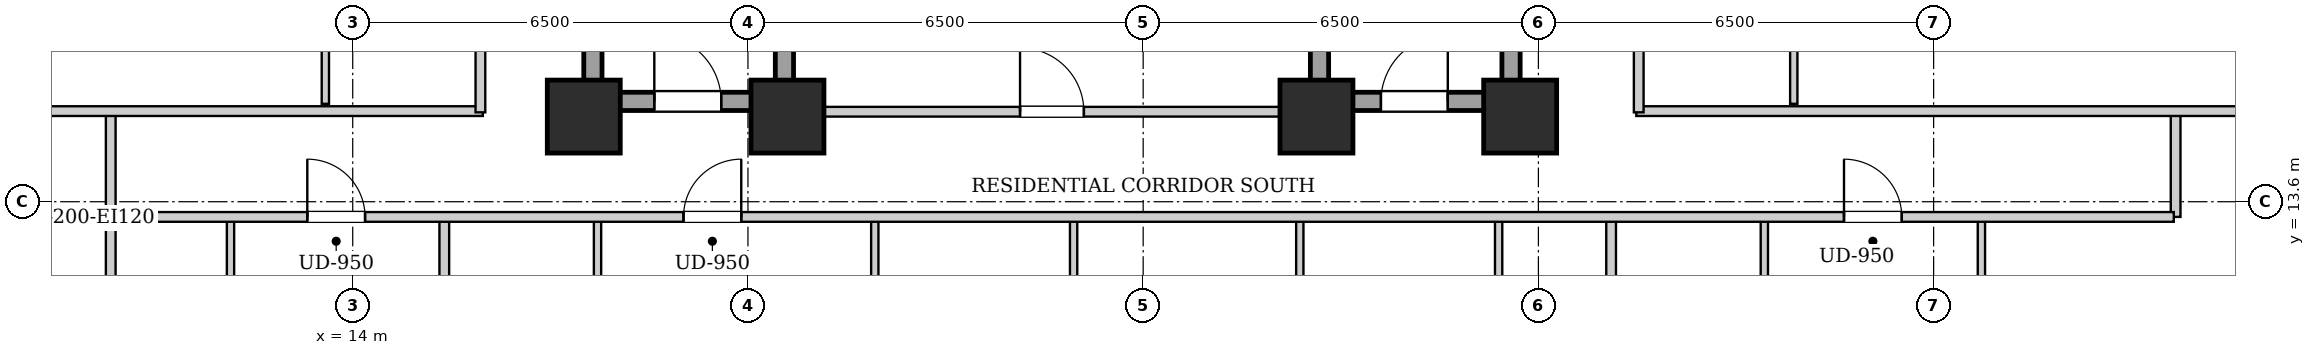
"""IFC4 building model, lengths in metres.
Left out: names, types, materials, properties, quantities, classifications, styles, units other than length and angle.
Written with IfcOpenShell. Run it as: python <this file> out.ifc"""

import sys

from ifc_helpers import new_model, si_unit, direction, frame, frame_2d, origin, origin_2d, place, context, subcontext, project, spatial, rectangle, extrude, element, fill, save


model = new_model("IFC4")
c1 = context("Model", 3, precision=1e-05, world=origin(), true_north=direction((0.0, 1.0)))
c2 = subcontext(c1, "Body", "Model", "MODEL_VIEW")
j1 = project(units=[si_unit("LENGTHUNIT", "METRE"), si_unit("PLANEANGLEUNIT", "RADIAN")], contexts=[c1])
p1 = place(None, origin())
s1 = spatial("IfcSite", under=j1, at=p1, CompositionType="ELEMENT")
p2 = place(p1, origin())
s2 = spatial("IfcBuilding", under=s1, at=p2, CompositionType="ELEMENT")
p3 = place(p2, frame((0.0, 0.0, 48.2)))
s3 = spatial("IfcBuildingStorey", under=s2, at=p3, CompositionType="ELEMENT", Elevation=48.2)
for number, where, z_axis, x_axis in (
    (1, (17.8, 15.0, 0.0), (0.0, 0.0, 1.0), (1.0, 0.0, 0.0)),
    (2, (21.15, 15.0, 0.0), (0.0, 0.0, 1.0), (1.0, 0.0, 0.0)),
    (3, (29.85, 15.0, 0.0), (0.0, 0.0, 1.0), (1.0, 0.0, 0.0)),
    (4, (33.2, 15.0, 0.0), (0.0, 0.0, 1.0), (1.0, 0.0, 0.0)),
):
    element("IfcColumn", number, at=place(p3, frame(where, z_axis=z_axis, x_axis=x_axis)), inside=s3, PredefinedType="COLUMN", context=c2, shape_type="SweptSolid", body=[
        extrude(rectangle(XDim=1.2, YDim=1.2, at=origin_2d()), origin(), (0.0, 0.0, 1.0), 3.2),
    ])
for number, where, z_axis, x_axis in (
    (5, (17.95, 15.1, 0.0), (0.0, 0.0, 1.0), (0.0, 1.0, 0.0)),
    (6, (21.1, 15.1, 0.0), (0.0, 0.0, 1.0), (0.0, 1.0, 0.0)),
):
    element("IfcWall", number, at=place(p3, frame(where, z_axis=z_axis, x_axis=x_axis)), inside=s3, PredefinedType="SHEAR", context=c2, shape_type="SweptSolid", body=[
        extrude(rectangle(XDim=9.0, YDim=0.3, at=frame_2d((4.5, 0.0))), origin(), (0.0, 0.0, 1.0), 2.94),
    ])
p4 = place(p3, frame((18.1, 15.25, 0.0), z_axis=(0.0, 0.0, 1.0), x_axis=(1.0, 0.0, 0.0)))
e7 = element("IfcWall", 7, at=p4, inside=s3, PredefinedType="SHEAR", context=c2, shape_type="SweptSolid", body=[
    extrude(rectangle(XDim=2.85, YDim=0.3, at=frame_2d((1.425, 0.0))), origin(), (0.0, 0.0, 1.0), 2.94),
])
p5 = place(p4, frame((0.86, 0.0, 0.0)))
e8 = element("IfcOpeningElement", 8, at=p5, cuts=e7, PredefinedType="OPENING", context=c2, shape_type="SweptSolid", body=[
    extrude(rectangle(XDim=1.1, YDim=2.05, at=frame_2d((0.55, 1.025))), frame((0.0, 0.16, 0.0), z_axis=(0.0, -1.0, 0.0), x_axis=(1.0, 0.0, 0.0)), (0.0, 0.0, 1.0), 0.32),
])
for number, where, z_axis, x_axis in (
    (9, (29.9, 15.1, 0.0), (0.0, 0.0, 1.0), (0.0, 1.0, 0.0)),
    (10, (33.05, 15.1, 0.0), (0.0, 0.0, 1.0), (0.0, 1.0, 0.0)),
):
    element("IfcWall", number, at=place(p3, frame(where, z_axis=z_axis, x_axis=x_axis)), inside=s3, PredefinedType="SHEAR", context=c2, shape_type="SweptSolid", body=[
        extrude(rectangle(XDim=9.0, YDim=0.3, at=frame_2d((4.5, 0.0))), origin(), (0.0, 0.0, 1.0), 2.94),
    ])
p6 = place(p3, frame((30.05, 15.25, 0.0), z_axis=(0.0, 0.0, 1.0), x_axis=(1.0, 0.0, 0.0)))
e11 = element("IfcWall", 11, at=p6, inside=s3, PredefinedType="SHEAR", context=c2, shape_type="SweptSolid", body=[
    extrude(rectangle(XDim=2.85, YDim=0.3, at=frame_2d((1.425, 0.0))), origin(), (0.0, 0.0, 1.0), 2.94),
])
p7 = place(p6, frame((0.86, 0.0, 0.0)))
e12 = element("IfcOpeningElement", 12, at=p7, cuts=e11, PredefinedType="OPENING", context=c2, shape_type="SweptSolid", body=[
    extrude(rectangle(XDim=1.1, YDim=2.05, at=frame_2d((0.55, 1.025))), frame((0.0, 0.16, 0.0), z_axis=(0.0, -1.0, 0.0), x_axis=(1.0, 0.0, 0.0)), (0.0, 0.0, 1.0), 0.32),
])
p8 = place(p3, frame((21.25, 15.08, 0.0), z_axis=(0.0, 0.0, 1.0), x_axis=(1.0, 0.0, 0.0)))
e13 = element("IfcWall", 13, at=p8, inside=s3, PredefinedType="PARTITIONING", context=c2, shape_type="SweptSolid", body=[
    extrude(rectangle(XDim=8.5, YDim=0.16, at=frame_2d((4.25, 0.0))), origin(), (0.0, 0.0, 1.0), 2.232),
])
p9 = place(p8, frame((3.725, 0.0, 0.0)))
e14 = element("IfcOpeningElement", 14, at=p9, cuts=e13, PredefinedType="OPENING", context=c2, shape_type="SweptSolid", body=[
    extrude(rectangle(XDim=1.05, YDim=2.05, at=frame_2d((0.525, 1.025))), frame((0.0, 0.09, 0.0), z_axis=(0.0, -1.0, 0.0), x_axis=(1.0, 0.0, 0.0)), (0.0, 0.0, 1.0), 0.18),
])
for number, where, z_axis, x_axis in (
    (15, (10.02, 13.35, 0.0), (0.0, 0.0, 1.0), (0.0, 1.0, 0.0)),
    (16, (43.98, 13.35, 0.0), (0.0, 0.0, 1.0), (0.0, 1.0, 0.0)),
):
    element("IfcWall", number, at=place(p3, frame(where, z_axis=z_axis, x_axis=x_axis)), inside=s3, PredefinedType="PARTITIONING", context=c2, shape_type="SweptSolid", body=[
        extrude(rectangle(XDim=1.74, YDim=0.16, at=frame_2d((0.87, 0.0))), origin(), (0.0, 0.0, 1.0), 2.94),
    ])
p10 = place(p3, frame((7.78, 15.09, 0.0), z_axis=(0.0, 0.0, 1.0), x_axis=(1.0, 0.0, 0.0)))
e17 = element("IfcWall", 17, at=p10, inside=s3, PredefinedType="PARTITIONING", context=c2, shape_type="SweptSolid", body=[
    extrude(rectangle(XDim=8.36, YDim=0.16, at=frame_2d((4.18, 0.0))), origin(), (0.0, 0.0, 1.0), 2.232),
])
p11 = place(p3, frame((35.11, 15.09, 0.0), z_axis=(0.0, 0.0, 1.0), x_axis=(1.0, 0.0, 0.0)))
e18 = element("IfcWall", 18, at=p11, inside=s3, PredefinedType="PARTITIONING", context=c2, shape_type="SweptSolid", body=[
    extrude(rectangle(XDim=11.11, YDim=0.16, at=frame_2d((5.555, 0.0))), origin(), (0.0, 0.0, 1.0), 2.232),
])
p12 = place(p3, frame((10.02, 10.4, 0.0), z_axis=(0.0, 0.0, 1.0), x_axis=(0.0, 1.0, 0.0)))
e19 = element("IfcWall", 19, at=p12, inside=s3, PredefinedType="PARTITIONING", context=c2, shape_type="SweptSolid", body=[
    extrude(rectangle(XDim=2.91, YDim=0.16, at=frame_2d((1.455, 0.0))), origin(), (0.0, 0.0, 1.0), 2.94),
])
p13 = place(p3, frame((11.99, 10.46, 0.0), z_axis=(0.0, 0.0, 1.0), x_axis=(0.0, 1.0, 0.0)))
e20 = element("IfcWall", 20, at=p13, inside=s3, PredefinedType="PARTITIONING", context=c2, shape_type="SweptSolid", body=[
    extrude(rectangle(XDim=2.85, YDim=0.12, at=frame_2d((1.425, 0.0))), origin(), (0.0, 0.0, 1.0), 2.94),
])
p14 = place(p13, frame((0.995, 0.0, 0.0)))
e21 = element("IfcOpeningElement", 21, at=p14, cuts=e20, PredefinedType="OPENING", context=c2, shape_type="SweptSolid", body=[
    extrude(rectangle(XDim=0.86, YDim=2.05, at=frame_2d((0.43, 1.025))), frame((0.0, 0.07, 0.0), z_axis=(0.0, -1.0, 0.0), x_axis=(1.0, 0.0, 0.0)), (0.0, 0.0, 1.0), 0.14),
])
p15 = place(p3, frame((15.506, 2.26, 0.0), z_axis=(0.0, 0.0, 1.0), x_axis=(0.0, 1.0, 0.0)))
e22 = element("IfcWall", 22, at=p15, inside=s3, PredefinedType="PARTITIONING", context=c2, shape_type="SweptSolid", body=[
    extrude(rectangle(XDim=11.05, YDim=0.16, at=frame_2d((5.525, 0.0))), origin(), (0.0, 0.0, 1.0), 2.94),
])
p16 = place(p3, frame((18.026, 10.46, 0.0), z_axis=(0.0, 0.0, 1.0), x_axis=(0.0, 1.0, 0.0)))
e23 = element("IfcWall", 23, at=p16, inside=s3, PredefinedType="PARTITIONING", context=c2, shape_type="SweptSolid", body=[
    extrude(rectangle(XDim=2.85, YDim=0.12, at=frame_2d((1.425, 0.0))), origin(), (0.0, 0.0, 1.0), 2.94),
])
p17 = place(p16, frame((0.995, 0.0, 0.0)))
e24 = element("IfcOpeningElement", 24, at=p17, cuts=e23, PredefinedType="OPENING", context=c2, shape_type="SweptSolid", body=[
    extrude(rectangle(XDim=0.86, YDim=2.05, at=frame_2d((0.43, 1.025))), frame((0.0, 0.07, 0.0), z_axis=(0.0, -1.0, 0.0), x_axis=(1.0, 0.0, 0.0)), (0.0, 0.0, 1.0), 0.14),
])
p18 = place(p3, frame((22.586, 10.46, 0.0), z_axis=(0.0, 0.0, 1.0), x_axis=(0.0, 1.0, 0.0)))
e25 = element("IfcWall", 25, at=p18, inside=s3, PredefinedType="PARTITIONING", context=c2, shape_type="SweptSolid", body=[
    extrude(rectangle(XDim=2.85, YDim=0.12, at=frame_2d((1.425, 0.0))), origin(), (0.0, 0.0, 1.0), 2.94),
])
p19 = place(p18, frame((0.975, 0.0, 0.0)))
e26 = element("IfcOpeningElement", 26, at=p19, cuts=e25, PredefinedType="OPENING", context=c2, shape_type="SweptSolid", body=[
    extrude(rectangle(XDim=0.9, YDim=2.05, at=frame_2d((0.45, 1.025))), frame((0.0, 0.07, 0.0), z_axis=(0.0, -1.0, 0.0), x_axis=(1.0, 0.0, 0.0)), (0.0, 0.0, 1.0), 0.14),
])
p20 = place(p3, frame((25.856, 10.46, 0.0), z_axis=(0.0, 0.0, 1.0), x_axis=(0.0, 1.0, 0.0)))
e27 = element("IfcWall", 27, at=p20, inside=s3, PredefinedType="PARTITIONING", context=c2, shape_type="SweptSolid", body=[
    extrude(rectangle(XDim=2.85, YDim=0.12, at=frame_2d((1.425, 0.0))), origin(), (0.0, 0.0, 1.0), 2.94),
])
p21 = place(p20, frame((0.975, 0.0, 0.0)))
e28 = element("IfcOpeningElement", 28, at=p21, cuts=e27, PredefinedType="OPENING", context=c2, shape_type="SweptSolid", body=[
    extrude(rectangle(XDim=0.9, YDim=2.05, at=frame_2d((0.45, 1.025))), frame((0.0, 0.07, 0.0), z_axis=(0.0, -1.0, 0.0), x_axis=(1.0, 0.0, 0.0)), (0.0, 0.0, 1.0), 0.14),
])
p22 = place(p3, frame((29.576, 10.46, 0.0), z_axis=(0.0, 0.0, 1.0), x_axis=(0.0, 1.0, 0.0)))
e29 = element("IfcWall", 29, at=p22, inside=s3, PredefinedType="PARTITIONING", context=c2, shape_type="SweptSolid", body=[
    extrude(rectangle(XDim=2.85, YDim=0.12, at=frame_2d((1.425, 0.0))), origin(), (0.0, 0.0, 1.0), 2.94),
])
p23 = place(p22, frame((0.975, 0.0, 0.0)))
e30 = element("IfcOpeningElement", 30, at=p23, cuts=e29, PredefinedType="OPENING", context=c2, shape_type="SweptSolid", body=[
    extrude(rectangle(XDim=0.9, YDim=2.05, at=frame_2d((0.45, 1.025))), frame((0.0, 0.07, 0.0), z_axis=(0.0, -1.0, 0.0), x_axis=(1.0, 0.0, 0.0)), (0.0, 0.0, 1.0), 0.14),
])
p24 = place(p3, frame((32.846, 10.46, 0.0), z_axis=(0.0, 0.0, 1.0), x_axis=(0.0, 1.0, 0.0)))
e31 = element("IfcWall", 31, at=p24, inside=s3, PredefinedType="PARTITIONING", context=c2, shape_type="SweptSolid", body=[
    extrude(rectangle(XDim=2.85, YDim=0.12, at=frame_2d((1.425, 0.0))), origin(), (0.0, 0.0, 1.0), 2.94),
])
p25 = place(p24, frame((0.975, 0.0, 0.0)))
e32 = element("IfcOpeningElement", 32, at=p25, cuts=e31, PredefinedType="OPENING", context=c2, shape_type="SweptSolid", body=[
    extrude(rectangle(XDim=0.9, YDim=2.05, at=frame_2d((0.45, 1.025))), frame((0.0, 0.07, 0.0), z_axis=(0.0, -1.0, 0.0), x_axis=(1.0, 0.0, 0.0)), (0.0, 0.0, 1.0), 0.14),
])
p26 = place(p3, frame((34.696, 0.28, 0.0), z_axis=(0.0, 0.0, 1.0), x_axis=(0.0, 1.0, 0.0)))
e33 = element("IfcWall", 33, at=p26, inside=s3, PredefinedType="PARTITIONING", context=c2, shape_type="SweptSolid", body=[
    extrude(rectangle(XDim=13.03, YDim=0.16, at=frame_2d((6.515, 0.0))), origin(), (0.0, 0.0, 1.0), 2.94),
])
p27 = place(p3, frame((37.216, 10.46, 0.0), z_axis=(0.0, 0.0, 1.0), x_axis=(0.0, 1.0, 0.0)))
e34 = element("IfcWall", 34, at=p27, inside=s3, PredefinedType="PARTITIONING", context=c2, shape_type="SweptSolid", body=[
    extrude(rectangle(XDim=2.85, YDim=0.12, at=frame_2d((1.425, 0.0))), origin(), (0.0, 0.0, 1.0), 2.94),
])
p28 = place(p27, frame((0.995, 0.0, 0.0)))
e35 = element("IfcOpeningElement", 35, at=p28, cuts=e34, PredefinedType="OPENING", context=c2, shape_type="SweptSolid", body=[
    extrude(rectangle(XDim=0.86, YDim=2.05, at=frame_2d((0.43, 1.025))), frame((0.0, 0.07, 0.0), z_axis=(0.0, -1.0, 0.0), x_axis=(1.0, 0.0, 0.0)), (0.0, 0.0, 1.0), 0.14),
])
p29 = place(p3, frame((40.786, 10.46, 0.0), z_axis=(0.0, 0.0, 1.0), x_axis=(0.0, 1.0, 0.0)))
e36 = element("IfcWall", 36, at=p29, inside=s3, PredefinedType="PARTITIONING", context=c2, shape_type="SweptSolid", body=[
    extrude(rectangle(XDim=2.85, YDim=0.12, at=frame_2d((1.425, 0.0))), origin(), (0.0, 0.0, 1.0), 2.94),
])
p30 = place(p29, frame((0.975, 0.0, 0.0)))
e37 = element("IfcOpeningElement", 37, at=p30, cuts=e36, PredefinedType="OPENING", context=c2, shape_type="SweptSolid", body=[
    extrude(rectangle(XDim=0.9, YDim=2.05, at=frame_2d((0.45, 1.025))), frame((0.0, 0.07, 0.0), z_axis=(0.0, -1.0, 0.0), x_axis=(1.0, 0.0, 0.0)), (0.0, 0.0, 1.0), 0.14),
])
p31 = place(p3, frame((13.55, 15.21, 0.0), z_axis=(0.0, 0.0, 1.0), x_axis=(0.0, 1.0, 0.0)))
e38 = element("IfcWall", 38, at=p31, inside=s3, PredefinedType="PARTITIONING", context=c2, shape_type="SweptSolid", body=[
    extrude(rectangle(XDim=2.3, YDim=0.12, at=frame_2d((1.15, 0.0))), origin(), (0.0, 0.0, 1.0), 2.94),
])
p32 = place(p3, frame((37.7, 15.21, 0.0), z_axis=(0.0, 0.0, 1.0), x_axis=(0.0, 1.0, 0.0)))
e39 = element("IfcWall", 39, at=p32, inside=s3, PredefinedType="PARTITIONING", context=c2, shape_type="SweptSolid", body=[
    extrude(rectangle(XDim=2.159, YDim=0.12, at=frame_2d((1.08, 0.0))), origin(), (0.0, 0.0, 1.0), 2.94),
])
p33 = place(p3, frame((10.05, 13.35, 0.0), z_axis=(0.0, 0.0, 1.0), x_axis=(1.0, 0.0, 0.0)))
e40 = element("IfcWall", 40, at=p33, inside=s3, PredefinedType="PARTITIONING", context=c2, shape_type="SweptSolid", body=[
    extrude(rectangle(XDim=33.9, YDim=0.16, at=frame_2d((16.95, 0.0))), origin(), (0.0, 0.0, 1.0), 2.94),
])
p34 = place(p33, frame((3.203, 0.0, 0.0)))
e41 = element("IfcOpeningElement", 41, at=p34, cuts=e40, PredefinedType="OPENING", context=c2, shape_type="SweptSolid", body=[
    extrude(rectangle(XDim=0.95, YDim=2.1, at=frame_2d((0.475, 1.05))), frame((0.0, 0.09, 0.0), z_axis=(0.0, -1.0, 0.0), x_axis=(1.0, 0.0, 0.0)), (0.0, 0.0, 1.0), 0.18),
])
p35 = place(p33, frame((9.39, 0.0, 0.0)))
e42 = element("IfcOpeningElement", 42, at=p35, cuts=e40, PredefinedType="OPENING", context=c2, shape_type="SweptSolid", body=[
    extrude(rectangle(XDim=0.95, YDim=2.1, at=frame_2d((0.475, 1.05))), frame((0.0, 0.09, 0.0), z_axis=(0.0, -1.0, 0.0), x_axis=(1.0, 0.0, 0.0)), (0.0, 0.0, 1.0), 0.18),
])
p36 = place(p33, frame((28.476, 0.0, 0.0)))
e43 = element("IfcOpeningElement", 43, at=p36, cuts=e40, PredefinedType="OPENING", context=c2, shape_type="SweptSolid", body=[
    extrude(rectangle(XDim=0.95, YDim=2.1, at=frame_2d((0.475, 1.05))), frame((0.0, 0.09, 0.0), z_axis=(0.0, -1.0, 0.0), x_axis=(1.0, 0.0, 0.0)), (0.0, 0.0, 1.0), 0.18),
])
p37 = place(p3, frame((16.1, 15.07, 0.0), z_axis=(0.0, 0.0, 1.0), x_axis=(0.0, 1.0, 0.0)))
e44 = element("IfcWall", 44, at=p37, inside=s3, PredefinedType="PARTITIONING", context=c2, shape_type="SweptSolid", body=[
    extrude(rectangle(XDim=13.93, YDim=0.16, at=frame_2d((6.965, 0.0))), origin(), (0.0, 0.0, 1.0), 2.94),
])
p38 = place(p37, frame((4.385, 0.0, 0.0)))
e45 = element("IfcOpeningElement", 45, at=p38, cuts=e44, PredefinedType="OPENING", context=c2, shape_type="SweptSolid", body=[
    extrude(rectangle(XDim=0.95, YDim=2.1, at=frame_2d((0.475, 1.05))), frame((0.0, 0.09, 0.0), z_axis=(0.0, -1.0, 0.0), x_axis=(1.0, 0.0, 0.0)), (0.0, 0.0, 1.0), 0.18),
])
p39 = place(p3, frame((35.15, 15.07, 0.0), z_axis=(0.0, 0.0, 1.0), x_axis=(0.0, 1.0, 0.0)))
e46 = element("IfcWall", 46, at=p39, inside=s3, PredefinedType="PARTITIONING", context=c2, shape_type="SweptSolid", body=[
    extrude(rectangle(XDim=13.93, YDim=0.16, at=frame_2d((6.965, 0.0))), origin(), (0.0, 0.0, 1.0), 2.94),
])
p40 = place(p39, frame((4.661, 0.0, 0.0)))
e47 = element("IfcOpeningElement", 47, at=p40, cuts=e46, PredefinedType="OPENING", context=c2, shape_type="SweptSolid", body=[
    extrude(rectangle(XDim=0.95, YDim=2.1, at=frame_2d((0.475, 1.05))), frame((0.0, 0.09, 0.0), z_axis=(0.0, -1.0, 0.0), x_axis=(1.0, 0.0, 0.0)), (0.0, 0.0, 1.0), 0.18),
])
p41 = place(p39, frame((11.411, 0.0, 0.0)))
e48 = element("IfcOpeningElement", 48, at=p41, cuts=e46, PredefinedType="OPENING", context=c2, shape_type="SweptSolid", body=[
    extrude(rectangle(XDim=0.95, YDim=2.1, at=frame_2d((0.475, 1.05))), frame((0.0, 0.09, 0.0), z_axis=(0.0, -1.0, 0.0), x_axis=(1.0, 0.0, 0.0)), (0.0, 0.0, 1.0), 0.18),
])
p42 = place(p5, origin())
e49 = element("IfcDoor", 49, at=p42, inside=s3, OperationType="SINGLE_SWING_LEFT", PredefinedType="DOOR", context=c2, shape_type="SweptSolid", body=[
    extrude(rectangle(XDim=1.1, YDim=2.05, at=frame_2d((0.55, 1.025))), frame((0.0, 0.025, 0.0), z_axis=(0.0, -1.0, 0.0), x_axis=(1.0, 0.0, 0.0)), (0.0, 0.0, 1.0), 0.05),
])
fill(e8, e49)
p43 = place(p7, origin())
e50 = element("IfcDoor", 50, at=p43, inside=s3, OperationType="SINGLE_SWING_RIGHT", PredefinedType="DOOR", context=c2, shape_type="SweptSolid", body=[
    extrude(rectangle(XDim=1.1, YDim=2.05, at=frame_2d((0.55, 1.025))), frame((0.0, 0.025, 0.0), z_axis=(0.0, -1.0, 0.0), x_axis=(1.0, 0.0, 0.0)), (0.0, 0.0, 1.0), 0.05),
])
fill(e12, e50)
p44 = place(p9, origin())
e51 = element("IfcDoor", 51, at=p44, inside=s3, OperationType="SINGLE_SWING_LEFT", PredefinedType="DOOR", context=c2, shape_type="SweptSolid", body=[
    extrude(rectangle(XDim=1.05, YDim=2.05, at=frame_2d((0.525, 1.025))), frame((0.0, 0.025, 0.0), z_axis=(0.0, -1.0, 0.0), x_axis=(1.0, 0.0, 0.0)), (0.0, 0.0, 1.0), 0.05),
])
fill(e14, e51)
p45 = place(p34, origin())
e52 = element("IfcDoor", 52, at=p45, inside=s3, OperationType="SINGLE_SWING_LEFT", PredefinedType="DOOR", context=c2, shape_type="SweptSolid", body=[
    extrude(rectangle(XDim=0.95, YDim=2.1, at=frame_2d((0.475, 1.05))), frame((0.0, 0.025, 0.0), z_axis=(0.0, -1.0, 0.0), x_axis=(1.0, 0.0, 0.0)), (0.0, 0.0, 1.0), 0.05),
])
fill(e41, e52)
p46 = place(p35, origin())
e53 = element("IfcDoor", 53, at=p46, inside=s3, OperationType="SINGLE_SWING_RIGHT", PredefinedType="DOOR", context=c2, shape_type="SweptSolid", body=[
    extrude(rectangle(XDim=0.95, YDim=2.1, at=frame_2d((0.475, 1.05))), frame((0.0, 0.025, 0.0), z_axis=(0.0, -1.0, 0.0), x_axis=(1.0, 0.0, 0.0)), (0.0, 0.0, 1.0), 0.05),
])
fill(e42, e53)
p47 = place(p36, origin())
e54 = element("IfcDoor", 54, at=p47, inside=s3, OperationType="SINGLE_SWING_LEFT", PredefinedType="DOOR", context=c2, shape_type="SweptSolid", body=[
    extrude(rectangle(XDim=0.95, YDim=2.1, at=frame_2d((0.475, 1.05))), frame((0.0, 0.025, 0.0), z_axis=(0.0, -1.0, 0.0), x_axis=(1.0, 0.0, 0.0)), (0.0, 0.0, 1.0), 0.05),
])
fill(e43, e54)
save(model, sys.argv[1])
